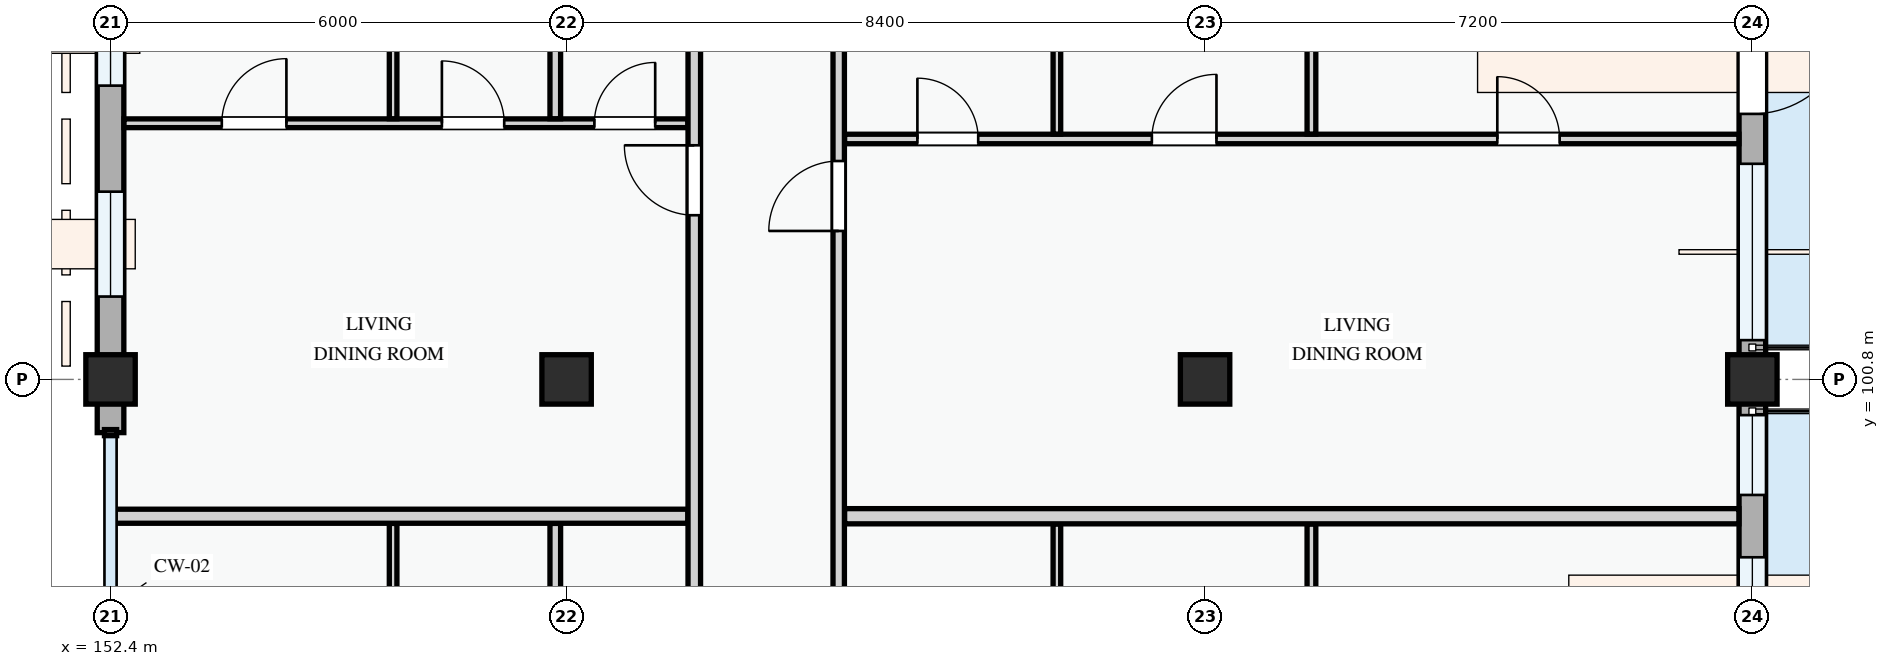
"""IFC4 building model, lengths in metres.
Left out: names, types, materials, properties, quantities, classifications, styles, units other than length and angle.
Written with IfcOpenShell. Run it as: python <this file> out.ifc"""

import sys

from ifc_helpers import new_model, si_unit, direction, frame, frame_2d, origin, origin_2d, place, context, subcontext, project, spatial, rectangle, extrude, element, fill, save


model = new_model("IFC4")
c1 = context("Model", 3, precision=1e-05, world=origin(), true_north=direction((0.0, 1.0)))
c2 = subcontext(c1, "Body", "Model", "MODEL_VIEW")
j1 = project(units=[si_unit("LENGTHUNIT", "METRE"), si_unit("PLANEANGLEUNIT", "RADIAN")], contexts=[c1])
p1 = place(None, origin())
s1 = spatial("IfcSite", under=j1, at=p1, CompositionType="ELEMENT")
p2 = place(p1, origin())
s2 = spatial("IfcBuilding", under=s1, at=p2, CompositionType="ELEMENT")
p3 = place(p2, frame((0.0, 0.0, 11.4)))
s3 = spatial("IfcBuildingStorey", under=s2, at=p3, CompositionType="ELEMENT", Elevation=11.4)
for number, where, z_axis, x_axis in (
    (1, (152.4, 100.8, 0.0), (0.0, 0.0, 1.0), (1.0, 0.0, 0.0)),
    (2, (158.4, 100.8, 0.0), (0.0, 0.0, 1.0), (1.0, 0.0, 0.0)),
    (3, (166.8, 100.8, 0.0), (0.0, 0.0, 1.0), (1.0, 0.0, 0.0)),
    (4, (174.0, 100.8, 0.0), (0.0, 0.0, 1.0), (1.0, 0.0, 0.0)),
):
    element("IfcColumn", number, at=place(p3, frame(where, z_axis=z_axis, x_axis=x_axis)), inside=s3, PredefinedType="COLUMN", context=c2, shape_type="SweptSolid", body=[
        extrude(rectangle(XDim=0.65, YDim=0.65, at=origin_2d()), origin(), (0.0, 0.0, 1.0), 3.3),
    ])
p4 = place(p3, frame((152.4, 109.2, 0.0), z_axis=(0.0, 0.0, 1.0), x_axis=(0.0, -1.0, 0.0)))
e5 = element("IfcWall", 5, at=p4, inside=s3, PredefinedType="STANDARD", context=c2, shape_type="SweptSolid", body=[
    extrude(rectangle(XDim=8.4, YDim=0.35, at=frame_2d((4.2, 0.0))), origin(), (0.0, 0.0, 1.0), 2.425),
])
p5 = place(p4, frame((0.985, 0.0, 0.78)))
e6 = element("IfcOpeningElement", 6, at=p5, cuts=e5, PredefinedType="OPENING", context=c2, shape_type="SweptSolid", body=[
    extrude(rectangle(XDim=0.9, YDim=1.2, at=frame_2d((0.45, 0.6))), frame((0.0, 0.185, 0.0), z_axis=(0.0, -1.0, 0.0), x_axis=(1.0, 0.0, 0.0)), (0.0, 0.0, 1.0), 0.37),
])
p6 = place(p4, frame((3.035, 0.0, 0.78)))
e7 = element("IfcOpeningElement", 7, at=p6, cuts=e5, PredefinedType="OPENING", context=c2, shape_type="SweptSolid", body=[
    extrude(rectangle(XDim=1.5, YDim=1.5, at=frame_2d((0.75, 0.75))), frame((0.0, 0.185, 0.0), z_axis=(0.0, -1.0, 0.0), x_axis=(1.0, 0.0, 0.0)), (0.0, 0.0, 1.0), 0.37),
])
p7 = place(p4, frame((5.93, 0.0, 0.78)))
e8 = element("IfcOpeningElement", 8, at=p7, cuts=e5, PredefinedType="OPENING", context=c2, shape_type="SweptSolid", body=[
    extrude(rectangle(XDim=1.38, YDim=1.48, at=frame_2d((0.69, 0.74))), frame((0.0, 0.185, 0.0), z_axis=(0.0, -1.0, 0.0), x_axis=(1.0, 0.0, 0.0)), (0.0, 0.0, 1.0), 0.37),
])
p8 = place(p3, frame((152.4, 100.8, 0.0), z_axis=(0.0, 0.0, 1.0), x_axis=(0.0, -1.0, 0.0)))
e9 = element("IfcWall", 9, at=p8, inside=s3, PredefinedType="STANDARD", context=c2, shape_type="SweptSolid", body=[
    extrude(rectangle(XDim=0.7, YDim=0.35, at=frame_2d((0.35, 0.0))), origin(), (0.0, 0.0, 1.0), 2.575),
])
p9 = place(p3, frame((174.0, 94.8, 0.0), z_axis=(0.0, 0.0, 1.0), x_axis=(0.0, 1.0, 0.0)))
e10 = element("IfcWall", 10, at=p9, inside=s3, PredefinedType="STANDARD", context=c2, shape_type="SweptSolid", body=[
    extrude(rectangle(XDim=6.0, YDim=0.35, at=frame_2d((3.0, 0.0))), origin(), (0.0, 0.0, 1.0), 2.575),
])
p10 = place(p9, frame((0.62, 0.0, 0.0)))
e11 = element("IfcOpeningElement", 11, at=p10, cuts=e10, PredefinedType="OPENING", context=c2, shape_type="SweptSolid", body=[
    extrude(rectangle(XDim=1.25, YDim=2.2, at=frame_2d((0.625, 1.1))), frame((0.0, 0.185, 0.0), z_axis=(0.0, -1.0, 0.0), x_axis=(1.0, 0.0, 0.0)), (0.0, 0.0, 1.0), 0.37),
])
p11 = place(p9, frame((2.46, 0.0, 0.78)))
e12 = element("IfcOpeningElement", 12, at=p11, cuts=e10, PredefinedType="OPENING", context=c2, shape_type="SweptSolid", body=[
    extrude(rectangle(XDim=1.2, YDim=1.5, at=frame_2d((0.6, 0.75))), frame((0.0, 0.185, 0.0), z_axis=(0.0, -1.0, 0.0), x_axis=(1.0, 0.0, 0.0)), (0.0, 0.0, 1.0), 0.37),
])
p12 = place(p9, frame((4.48, 0.0, 0.78)))
e13 = element("IfcOpeningElement", 13, at=p12, cuts=e10, PredefinedType="OPENING", context=c2, shape_type="SweptSolid", body=[
    extrude(rectangle(XDim=1.05, YDim=1.2, at=frame_2d((0.525, 0.6))), frame((0.0, 0.185, 0.0), z_axis=(0.0, -1.0, 0.0), x_axis=(1.0, 0.0, 0.0)), (0.0, 0.0, 1.0), 0.37),
])
p13 = place(p3, frame((174.0, 100.8, 0.0), z_axis=(0.0, 0.0, 1.0), x_axis=(0.0, 1.0, 0.0)))
e14 = element("IfcWall", 14, at=p13, inside=s3, PredefinedType="STANDARD", context=c2, shape_type="SweptSolid", body=[
    extrude(rectangle(XDim=8.4, YDim=0.35, at=frame_2d((4.2, 0.0))), origin(), (0.0, 0.0, 1.0), 2.425),
])
p14 = place(p13, frame((3.493, 0.0, 0.0)))
e15 = element("IfcOpeningElement", 15, at=p14, cuts=e14, PredefinedType="OPENING", context=c2, shape_type="SweptSolid", body=[
    extrude(rectangle(XDim=1.3, YDim=2.15, at=frame_2d((0.65, 1.075))), frame((0.0, 0.185, 0.0), z_axis=(0.0, -1.0, 0.0), x_axis=(1.0, 0.0, 0.0)), (0.0, 0.0, 1.0), 0.37),
])
p15 = place(p13, frame((0.517, 0.0, 0.78)))
e16 = element("IfcOpeningElement", 16, at=p15, cuts=e14, PredefinedType="OPENING", context=c2, shape_type="SweptSolid", body=[
    extrude(rectangle(XDim=2.32, YDim=1.5, at=frame_2d((1.16, 0.75))), frame((0.0, 0.185, 0.0), z_axis=(0.0, -1.0, 0.0), x_axis=(1.0, 0.0, 0.0)), (0.0, 0.0, 1.0), 0.37),
])
p16 = place(p13, frame((5.537, 0.0, 0.78)))
e17 = element("IfcOpeningElement", 17, at=p16, cuts=e14, PredefinedType="OPENING", context=c2, shape_type="SweptSolid", body=[
    extrude(rectangle(XDim=1.98, YDim=1.5, at=frame_2d((0.99, 0.75))), frame((0.0, 0.185, 0.0), z_axis=(0.0, -1.0, 0.0), x_axis=(1.0, 0.0, 0.0)), (0.0, 0.0, 1.0), 0.37),
])
p17 = place(p3, frame((156.118, 93.1, 0.0), z_axis=(0.0, 0.0, 1.0), x_axis=(0.0, 1.0, 0.0)))
e18 = element("IfcWall", 18, at=p17, inside=s3, PredefinedType="PARTITIONING", context=c2, shape_type="SweptSolid", body=[
    extrude(rectangle(XDim=5.806, YDim=0.1, at=frame_2d((2.903, 0.0))), origin(), (0.0, 0.0, 1.0), 3.0),
])
p18 = place(p3, frame((158.251, 93.1, 0.0), z_axis=(0.0, 0.0, 1.0), x_axis=(0.0, 1.0, 0.0)))
e19 = element("IfcWall", 19, at=p18, inside=s3, PredefinedType="PARTITIONING", context=c2, shape_type="SweptSolid", body=[
    extrude(rectangle(XDim=5.806, YDim=0.14, at=frame_2d((2.903, 0.0))), origin(), (0.0, 0.0, 1.0), 2.425),
])
p19 = place(p3, frame((168.199, 93.13, 0.0), z_axis=(0.0, 0.0, 1.0), x_axis=(0.0, 1.0, 0.0)))
e20 = element("IfcWall", 20, at=p19, inside=s3, PredefinedType="PARTITIONING", context=c2, shape_type="SweptSolid", body=[
    extrude(rectangle(XDim=5.768, YDim=0.115, at=frame_2d((2.884, 0.0))), origin(), (0.0, 0.0, 1.0), 3.0),
])
p20 = place(p3, frame((164.85, 93.13, 0.0), z_axis=(0.0, 0.0, 1.0), x_axis=(0.0, 1.0, 0.0)))
e21 = element("IfcWall", 21, at=p20, inside=s3, PredefinedType="PARTITIONING", context=c2, shape_type="SweptSolid", body=[
    extrude(rectangle(XDim=5.768, YDim=0.1, at=frame_2d((2.884, 0.0))), origin(), (0.0, 0.0, 1.0), 3.0),
])
p21 = place(p3, frame((152.577, 104.17, 0.0), z_axis=(0.0, 0.0, 1.0), x_axis=(1.0, 0.0, 0.0)))
e22 = element("IfcWall", 22, at=p21, inside=s3, PredefinedType="PARTITIONING", context=c2, shape_type="SweptSolid", body=[
    extrude(rectangle(XDim=7.419, YDim=0.115, at=frame_2d((3.709, 0.0))), origin(), (0.0, 0.0, 1.0), 3.0),
])
p22 = place(p21, frame((1.287, 0.0, 0.0)))
e23 = element("IfcOpeningElement", 23, at=p22, cuts=e22, PredefinedType="OPENING", context=c2, shape_type="SweptSolid", body=[
    extrude(rectangle(XDim=0.85, YDim=2.1, at=frame_2d((0.425, 1.05))), frame((0.0, 0.067, 0.0), z_axis=(0.0, -1.0, 0.0), x_axis=(1.0, 0.0, 0.0)), (0.0, 0.0, 1.0), 0.135),
])
p23 = place(p21, frame((4.182, 0.0, 0.0)))
e24 = element("IfcOpeningElement", 24, at=p23, cuts=e22, PredefinedType="OPENING", context=c2, shape_type="SweptSolid", body=[
    extrude(rectangle(XDim=0.82, YDim=2.08, at=frame_2d((0.41, 1.04))), frame((0.0, 0.067, 0.0), z_axis=(0.0, -1.0, 0.0), x_axis=(1.0, 0.0, 0.0)), (0.0, 0.0, 1.0), 0.135),
])
p24 = place(p21, frame((6.189, 0.0, 0.0)))
e25 = element("IfcOpeningElement", 25, at=p24, cuts=e22, PredefinedType="OPENING", context=c2, shape_type="SweptSolid", body=[
    extrude(rectangle(XDim=0.8, YDim=2.1, at=frame_2d((0.4, 1.05))), frame((0.0, 0.067, 0.0), z_axis=(0.0, -1.0, 0.0), x_axis=(1.0, 0.0, 0.0)), (0.0, 0.0, 1.0), 0.135),
])
p25 = place(p3, frame((156.118, 104.229, 0.0), z_axis=(0.0, 0.0, 1.0), x_axis=(0.0, 1.0, 0.0)))
e26 = element("IfcWall", 26, at=p25, inside=s3, PredefinedType="PARTITIONING", context=c2, shape_type="SweptSolid", body=[
    extrude(rectangle(XDim=4.999, YDim=0.1, at=frame_2d((2.499, 0.0))), origin(), (0.0, 0.0, 1.0), 3.0),
])
p26 = place(p3, frame((158.251, 104.229, 0.0), z_axis=(0.0, 0.0, 1.0), x_axis=(0.0, 1.0, 0.0)))
e27 = element("IfcWall", 27, at=p26, inside=s3, PredefinedType="PARTITIONING", context=c2, shape_type="SweptSolid", body=[
    extrude(rectangle(XDim=4.999, YDim=0.14, at=frame_2d((2.499, 0.0))), origin(), (0.0, 0.0, 1.0), 2.425),
])
p27 = place(p3, frame((162.057, 103.963, 0.0), z_axis=(0.0, 0.0, 1.0), x_axis=(1.0, 0.0, 0.0)))
e28 = element("IfcWall", 28, at=p27, inside=s3, PredefinedType="PARTITIONING", context=c2, shape_type="SweptSolid", body=[
    extrude(rectangle(XDim=11.766, YDim=0.125, at=frame_2d((5.883, 0.0))), origin(), (0.0, 0.0, 1.0), 3.0),
])
p28 = place(p27, frame((0.958, 0.0, 0.0)))
e29 = element("IfcOpeningElement", 29, at=p28, cuts=e28, PredefinedType="OPENING", context=c2, shape_type="SweptSolid", body=[
    extrude(rectangle(XDim=0.8, YDim=2.1, at=frame_2d((0.4, 1.05))), frame((0.0, 0.073, 0.0), z_axis=(0.0, -1.0, 0.0), x_axis=(1.0, 0.0, 0.0)), (0.0, 0.0, 1.0), 0.145),
])
p29 = place(p27, frame((4.043, 0.0, 0.0)))
e30 = element("IfcOpeningElement", 30, at=p29, cuts=e28, PredefinedType="OPENING", context=c2, shape_type="SweptSolid", body=[
    extrude(rectangle(XDim=0.85, YDim=2.1, at=frame_2d((0.425, 1.05))), frame((0.0, 0.073, 0.0), z_axis=(0.0, -1.0, 0.0), x_axis=(1.0, 0.0, 0.0)), (0.0, 0.0, 1.0), 0.145),
])
p30 = place(p27, frame((8.588, 0.0, 0.0)))
e31 = element("IfcOpeningElement", 31, at=p30, cuts=e28, PredefinedType="OPENING", context=c2, shape_type="SweptSolid", body=[
    extrude(rectangle(XDim=0.82, YDim=2.08, at=frame_2d((0.41, 1.04))), frame((0.0, 0.073, 0.0), z_axis=(0.0, -1.0, 0.0), x_axis=(1.0, 0.0, 0.0)), (0.0, 0.0, 1.0), 0.145),
])
p31 = place(p3, frame((168.199, 104.028, 0.0), z_axis=(0.0, 0.0, 1.0), x_axis=(0.0, 1.0, 0.0)))
e32 = element("IfcWall", 32, at=p31, inside=s3, PredefinedType="PARTITIONING", context=c2, shape_type="SweptSolid", body=[
    extrude(rectangle(XDim=5.218, YDim=0.115, at=frame_2d((2.609, 0.0))), origin(), (0.0, 0.0, 1.0), 3.0),
])
p32 = place(p3, frame((164.85, 104.028, 0.0), z_axis=(0.0, 0.0, 1.0), x_axis=(0.0, 1.0, 0.0)))
e33 = element("IfcWall", 33, at=p32, inside=s3, PredefinedType="PARTITIONING", context=c2, shape_type="SweptSolid", body=[
    extrude(rectangle(XDim=5.218, YDim=0.1, at=frame_2d((2.609, 0.0))), origin(), (0.0, 0.0, 1.0), 3.0),
])
p33 = place(p3, frame((152.46, 99.0, 0.0), z_axis=(0.0, 0.0, 1.0), x_axis=(1.0, 0.0, 0.0)))
e34 = element("IfcWall", 34, at=p33, inside=s3, PredefinedType="PARTITIONING", context=c2, shape_type="SweptSolid", body=[
    extrude(rectangle(XDim=7.536, YDim=0.185, at=frame_2d((3.768, 0.0))), origin(), (0.0, 0.0, 1.0), 3.0),
])
p34 = place(p3, frame((162.057, 99.0, 0.0), z_axis=(0.0, 0.0, 1.0), x_axis=(1.0, 0.0, 0.0)))
e35 = element("IfcWall", 35, at=p34, inside=s3, PredefinedType="PARTITIONING", context=c2, shape_type="SweptSolid", body=[
    extrude(rectangle(XDim=11.766, YDim=0.2, at=frame_2d((5.883, 0.0))), origin(), (0.0, 0.0, 1.0), 3.0),
])
p35 = place(p3, frame((160.08, 80.46, 0.0), z_axis=(0.0, 0.0, 1.0), x_axis=(0.0, 1.0, 0.0)))
e36 = element("IfcWall", 36, at=p35, inside=s3, PredefinedType="PARTITIONING", context=c2, shape_type="SweptSolid", body=[
    extrude(rectangle(XDim=28.88, YDim=0.165, at=frame_2d((14.44, 0.0))), origin(), (0.0, 0.0, 1.0), 3.0),
])
p36 = place(p35, frame((2.484, 0.0, 0.0)))
e37 = element("IfcOpeningElement", 37, at=p36, cuts=e36, PredefinedType="OPENING", context=c2, shape_type="SweptSolid", body=[
    extrude(rectangle(XDim=0.92, YDim=2.1, at=frame_2d((0.46, 1.05))), frame((0.0, 0.093, 0.0), z_axis=(0.0, -1.0, 0.0), x_axis=(1.0, 0.0, 0.0)), (0.0, 0.0, 1.0), 0.185),
])
p37 = place(p35, frame((10.07, 0.0, 0.0)))
e38 = element("IfcOpeningElement", 38, at=p37, cuts=e36, PredefinedType="OPENING", context=c2, shape_type="SweptSolid", body=[
    extrude(rectangle(XDim=0.92, YDim=2.1, at=frame_2d((0.46, 1.05))), frame((0.0, 0.093, 0.0), z_axis=(0.0, -1.0, 0.0), x_axis=(1.0, 0.0, 0.0)), (0.0, 0.0, 1.0), 0.185),
])
p38 = place(p35, frame((22.5, 0.0, 0.0)))
e39 = element("IfcOpeningElement", 39, at=p38, cuts=e36, PredefinedType="OPENING", context=c2, shape_type="SweptSolid", body=[
    extrude(rectangle(XDim=0.92, YDim=2.1, at=frame_2d((0.46, 1.05))), frame((0.0, 0.093, 0.0), z_axis=(0.0, -1.0, 0.0), x_axis=(1.0, 0.0, 0.0)), (0.0, 0.0, 1.0), 0.185),
])
p39 = place(p3, frame((161.98, 80.46, 0.0), z_axis=(0.0, 0.0, 1.0), x_axis=(0.0, 1.0, 0.0)))
e40 = element("IfcWall", 40, at=p39, inside=s3, PredefinedType="PARTITIONING", context=c2, shape_type="SweptSolid", body=[
    extrude(rectangle(XDim=28.88, YDim=0.15, at=frame_2d((14.44, 0.0))), origin(), (0.0, 0.0, 1.0), 3.0),
])
p40 = place(p39, frame((2.487, 0.0, 0.0)))
e41 = element("IfcOpeningElement", 41, at=p40, cuts=e40, PredefinedType="OPENING", context=c2, shape_type="SweptSolid", body=[
    extrude(rectangle(XDim=0.96, YDim=2.12, at=frame_2d((0.48, 1.06))), frame((0.0, 0.085, 0.0), z_axis=(0.0, -1.0, 0.0), x_axis=(1.0, 0.0, 0.0)), (0.0, 0.0, 1.0), 0.17),
])
p41 = place(p39, frame((10.07, 0.0, 0.0)))
e42 = element("IfcOpeningElement", 42, at=p41, cuts=e40, PredefinedType="OPENING", context=c2, shape_type="SweptSolid", body=[
    extrude(rectangle(XDim=0.92, YDim=2.1, at=frame_2d((0.46, 1.05))), frame((0.0, 0.085, 0.0), z_axis=(0.0, -1.0, 0.0), x_axis=(1.0, 0.0, 0.0)), (0.0, 0.0, 1.0), 0.17),
])
p42 = place(p39, frame((22.293, 0.0, 0.0)))
e43 = element("IfcOpeningElement", 43, at=p42, cuts=e40, PredefinedType="OPENING", context=c2, shape_type="SweptSolid", body=[
    extrude(rectangle(XDim=0.92, YDim=2.1, at=frame_2d((0.46, 1.05))), frame((0.0, 0.085, 0.0), z_axis=(0.0, -1.0, 0.0), x_axis=(1.0, 0.0, 0.0)), (0.0, 0.0, 1.0), 0.17),
])
p43 = place(p6, origin())
e44 = element("IfcWindow", 44, at=p43, inside=s3, PartitioningType="SINGLE_PANEL", PredefinedType="WINDOW", context=c2, shape_type="SweptSolid", body=[
    extrude(rectangle(XDim=1.5, YDim=1.5, at=frame_2d((0.75, 0.75))), frame((0.0, 0.03, 0.0), z_axis=(0.0, -1.0, 0.0), x_axis=(1.0, 0.0, 0.0)), (0.0, 0.0, 1.0), 0.06),
])
fill(e7, e44)
p44 = place(p7, origin())
e45 = element("IfcWindow", 45, at=p44, inside=s3, PartitioningType="SINGLE_PANEL", PredefinedType="WINDOW", context=c2, shape_type="SweptSolid", body=[
    extrude(rectangle(XDim=1.38, YDim=1.48, at=frame_2d((0.69, 0.74))), frame((0.0, 0.03, 0.0), z_axis=(0.0, -1.0, 0.0), x_axis=(1.0, 0.0, 0.0)), (0.0, 0.0, 1.0), 0.06),
])
fill(e8, e45)
p45 = place(p11, origin())
e46 = element("IfcWindow", 46, at=p45, inside=s3, PartitioningType="SINGLE_PANEL", PredefinedType="WINDOW", context=c2, shape_type="SweptSolid", body=[
    extrude(rectangle(XDim=1.2, YDim=1.5, at=frame_2d((0.6, 0.75))), frame((0.0, 0.03, 0.0), z_axis=(0.0, -1.0, 0.0), x_axis=(1.0, 0.0, 0.0)), (0.0, 0.0, 1.0), 0.06),
])
fill(e12, e46)
p46 = place(p12, origin())
e47 = element("IfcWindow", 47, at=p46, inside=s3, PartitioningType="SINGLE_PANEL", PredefinedType="WINDOW", context=c2, shape_type="SweptSolid", body=[
    extrude(rectangle(XDim=1.05, YDim=1.2, at=frame_2d((0.525, 0.6))), frame((0.0, 0.03, 0.0), z_axis=(0.0, -1.0, 0.0), x_axis=(1.0, 0.0, 0.0)), (0.0, 0.0, 1.0), 0.06),
])
fill(e13, e47)
p47 = place(p14, frame((1.3, 0.0, 0.0), z_axis=(0.0, 0.0, 1.0), x_axis=(-1.0, 0.0, 0.0)))
e48 = element("IfcDoor", 48, at=p47, inside=s3, OperationType="SINGLE_SWING_LEFT", PredefinedType="DOOR", context=c2, shape_type="SweptSolid", body=[
    extrude(rectangle(XDim=1.3, YDim=2.15, at=frame_2d((0.65, 1.075))), frame((0.0, 0.025, 0.0), z_axis=(0.0, -1.0, 0.0), x_axis=(1.0, 0.0, 0.0)), (0.0, 0.0, 1.0), 0.05),
])
fill(e15, e48)
p48 = place(p15, origin())
e49 = element("IfcWindow", 49, at=p48, inside=s3, PartitioningType="DOUBLE_PANEL_VERTICAL", PredefinedType="WINDOW", context=c2, shape_type="SweptSolid", body=[
    extrude(rectangle(XDim=2.32, YDim=1.5, at=frame_2d((1.16, 0.75))), frame((0.0, 0.03, 0.0), z_axis=(0.0, -1.0, 0.0), x_axis=(1.0, 0.0, 0.0)), (0.0, 0.0, 1.0), 0.06),
])
fill(e16, e49)
p49 = place(p22, origin())
e50 = element("IfcDoor", 50, at=p49, inside=s3, OperationType="SINGLE_SWING_RIGHT", PredefinedType="DOOR", context=c2, shape_type="SweptSolid", body=[
    extrude(rectangle(XDim=0.85, YDim=2.1, at=frame_2d((0.425, 1.05))), frame((0.0, 0.025, 0.0), z_axis=(0.0, -1.0, 0.0), x_axis=(1.0, 0.0, 0.0)), (0.0, 0.0, 1.0), 0.05),
])
fill(e23, e50)
p50 = place(p23, origin())
e51 = element("IfcDoor", 51, at=p50, inside=s3, OperationType="SINGLE_SWING_LEFT", PredefinedType="DOOR", context=c2, shape_type="SweptSolid", body=[
    extrude(rectangle(XDim=0.82, YDim=2.08, at=frame_2d((0.41, 1.04))), frame((0.0, 0.025, 0.0), z_axis=(0.0, -1.0, 0.0), x_axis=(1.0, 0.0, 0.0)), (0.0, 0.0, 1.0), 0.05),
])
fill(e24, e51)
p51 = place(p24, origin())
e52 = element("IfcDoor", 52, at=p51, inside=s3, OperationType="SINGLE_SWING_RIGHT", PredefinedType="DOOR", context=c2, shape_type="SweptSolid", body=[
    extrude(rectangle(XDim=0.8, YDim=2.1, at=frame_2d((0.4, 1.05))), frame((0.0, 0.025, 0.0), z_axis=(0.0, -1.0, 0.0), x_axis=(1.0, 0.0, 0.0)), (0.0, 0.0, 1.0), 0.05),
])
fill(e25, e52)
p52 = place(p28, origin())
e53 = element("IfcDoor", 53, at=p52, inside=s3, OperationType="SINGLE_SWING_LEFT", PredefinedType="DOOR", context=c2, shape_type="SweptSolid", body=[
    extrude(rectangle(XDim=0.8, YDim=2.1, at=frame_2d((0.4, 1.05))), frame((0.0, 0.025, 0.0), z_axis=(0.0, -1.0, 0.0), x_axis=(1.0, 0.0, 0.0)), (0.0, 0.0, 1.0), 0.05),
])
fill(e29, e53)
p53 = place(p29, origin())
e54 = element("IfcDoor", 54, at=p53, inside=s3, OperationType="SINGLE_SWING_RIGHT", PredefinedType="DOOR", context=c2, shape_type="SweptSolid", body=[
    extrude(rectangle(XDim=0.85, YDim=2.1, at=frame_2d((0.425, 1.05))), frame((0.0, 0.025, 0.0), z_axis=(0.0, -1.0, 0.0), x_axis=(1.0, 0.0, 0.0)), (0.0, 0.0, 1.0), 0.05),
])
fill(e30, e54)
p54 = place(p30, origin())
e55 = element("IfcDoor", 55, at=p54, inside=s3, OperationType="SINGLE_SWING_LEFT", PredefinedType="DOOR", context=c2, shape_type="SweptSolid", body=[
    extrude(rectangle(XDim=0.82, YDim=2.08, at=frame_2d((0.41, 1.04))), frame((0.0, 0.025, 0.0), z_axis=(0.0, -1.0, 0.0), x_axis=(1.0, 0.0, 0.0)), (0.0, 0.0, 1.0), 0.05),
])
fill(e31, e55)
p55 = place(p38, origin())
e56 = element("IfcDoor", 56, at=p55, inside=s3, OperationType="SINGLE_SWING_RIGHT", PredefinedType="DOOR", context=c2, shape_type="SweptSolid", body=[
    extrude(rectangle(XDim=0.92, YDim=2.1, at=frame_2d((0.46, 1.05))), frame((0.0, 0.025, 0.0), z_axis=(0.0, -1.0, 0.0), x_axis=(1.0, 0.0, 0.0)), (0.0, 0.0, 1.0), 0.05),
])
fill(e39, e56)
p56 = place(p42, origin())
e57 = element("IfcDoor", 57, at=p56, inside=s3, OperationType="SINGLE_SWING_LEFT", PredefinedType="DOOR", context=c2, shape_type="SweptSolid", body=[
    extrude(rectangle(XDim=0.92, YDim=2.1, at=frame_2d((0.46, 1.05))), frame((0.0, 0.025, 0.0), z_axis=(0.0, -1.0, 0.0), x_axis=(1.0, 0.0, 0.0)), (0.0, 0.0, 1.0), 0.05),
])
fill(e43, e57)
save(model, sys.argv[1])
